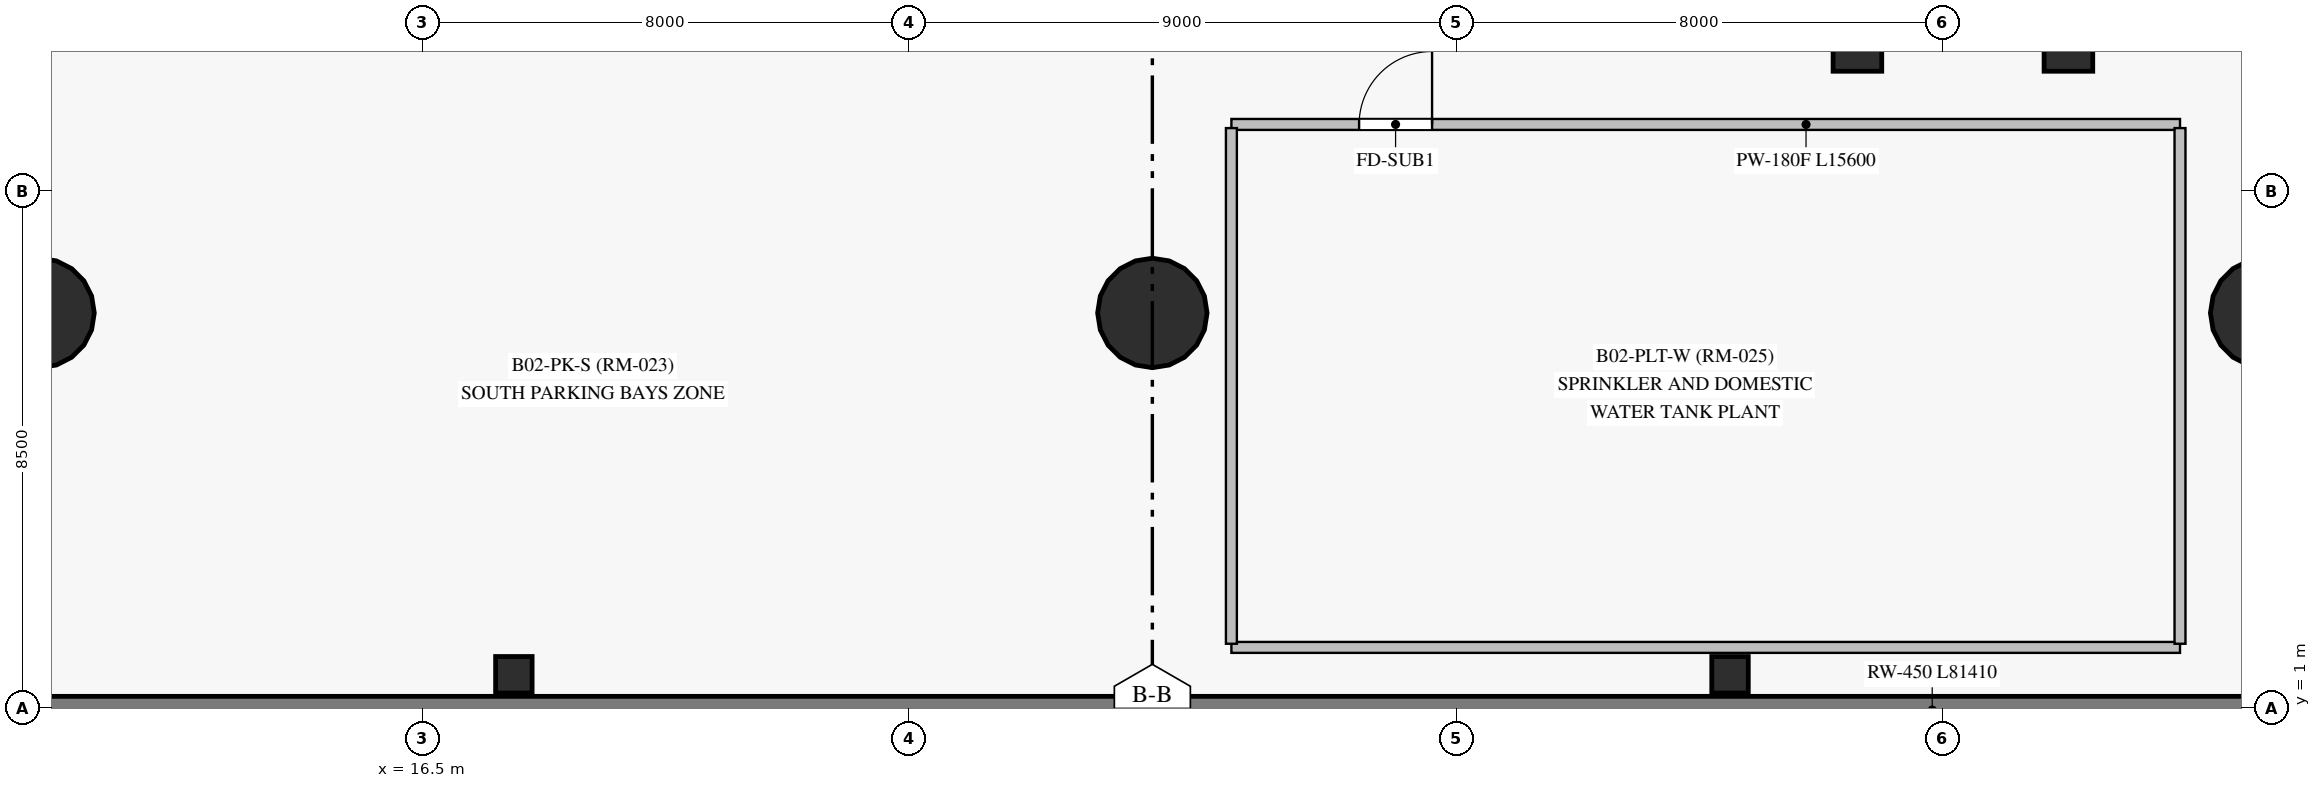
"""IFC4 building model, lengths in metres.
Left out: names, types, materials, properties, quantities, classifications, styles, units other than length and angle.
Written with IfcOpenShell. Run it as: python <this file> out.ifc"""

import sys

from ifc_helpers import new_model, si_unit, direction, frame, frame_2d, origin, origin_with_axes, origin_2d, place, context, subcontext, project, spatial, rectangle, circle, extrude, source, transform, mapped, element, fill, save


model = new_model("IFC4")
c1 = context("Model", 3, precision=1e-05, world=origin(), true_north=direction((0.0, 1.0)))
c2 = subcontext(c1, "Body", "Model", "MODEL_VIEW")
j1 = project(units=[si_unit("LENGTHUNIT", "METRE"), si_unit("PLANEANGLEUNIT", "RADIAN")], contexts=[c1])
p1 = place(None, origin())
s1 = spatial("IfcSite", under=j1, at=p1, CompositionType="ELEMENT")
p2 = place(p1, origin())
s2 = spatial("IfcBuilding", under=s1, at=p2, CompositionType="ELEMENT")
p3 = place(p2, frame((0.0, 0.0, -8.4)))
s3 = spatial("IfcBuildingStorey", under=s2, at=p3, CompositionType="ELEMENT", Elevation=-8.4)
m1 = source(origin_with_axes(), c2, "Body", "SweptSolid", [
    extrude(rectangle(XDim=0.8, YDim=0.8, at=origin_2d()), origin(), (0.0, 0.0, 1.0), 4.2),
])
for number, where, z_axis, x_axis in (
    (1, (40.095, 11.875, 0.0), (0.0, 0.0, 1.0), (1.0, 0.0, 0.0)),
    (2, (43.565, 11.875, 0.0), (0.0, 0.0, 1.0), (1.0, 0.0, 0.0)),
):
    element("IfcColumn", number, at=place(p3, frame(where, z_axis=z_axis, x_axis=x_axis)), inside=s3, PredefinedType="COLUMN", context=c2, shape_type="MappedRepresentation", body=[
        mapped(m1, transform((0.0, 0.0, 0.0), scale=1.0)),
    ])
m2 = source(origin_with_axes(), c2, "Body", "SweptSolid", [
    extrude(rectangle(XDim=0.6, YDim=0.6, at=origin_2d()), origin(), (0.0, 0.0, 1.0), 4.2),
])
for number, where, z_axis, x_axis in (
    (3, (18.0, 1.55, 0.0), (0.0, 0.0, 1.0), (1.0, 0.0, 0.0)),
    (4, (38.0, 1.55, 0.0), (0.0, 0.0, 1.0), (1.0, 0.0, 0.0)),
):
    element("IfcColumn", number, at=place(p3, frame(where, z_axis=z_axis, x_axis=x_axis)), inside=s3, PredefinedType="COLUMN", context=c2, shape_type="MappedRepresentation", body=[
        mapped(m2, transform((0.0, 0.0, 0.0), scale=1.0)),
    ])
p4 = place(p3, frame((0.62, 0.97, 0.0), z_axis=(0.0, 0.0, 1.0), x_axis=(1.0, 0.0, 0.0)))
e5 = element("IfcWall", 5, at=p4, inside=s3, PredefinedType="USERDEFINED", context=c2, shape_type="SweptSolid", body=[
    extrude(rectangle(XDim=81.41, YDim=0.45, at=frame_2d((40.705, 0.0))), origin(), (0.0, 0.0, 1.0), 3.85),
])
m3 = source(origin_with_axes(), c2, "Body", "SweptSolid", [
    extrude(circle(Radius=0.9, at=origin_2d()), origin(), (0.0, 0.0, 1.0), 4.2),
])
for number, where, z_axis, x_axis in (
    (6, (10.2, 7.5, 0.0), (0.0, 0.0, 1.0), (1.0, 0.0, 0.0)),
    (7, (28.5, 7.5, 0.0), (0.0, 0.0, 1.0), (1.0, 0.0, 0.0)),
    (8, (46.8, 7.5, 0.0), (0.0, 0.0, 1.0), (1.0, 0.0, 0.0)),
):
    element("IfcColumn", number, at=place(p3, frame(where, z_axis=z_axis, x_axis=x_axis)), inside=s3, PredefinedType="COLUMN", context=c2, shape_type="MappedRepresentation", body=[
        mapped(m3, transform((0.0, 0.0, 0.0), scale=1.0)),
    ])
p5 = place(p3, frame((29.8, 10.6, 0.0), z_axis=(0.0, 0.0, 1.0), x_axis=(1.0, 0.0, 0.0)))
e9 = element("IfcWall", 9, at=p5, inside=s3, PredefinedType="PARTITIONING", context=c2, shape_type="SweptSolid", body=[
    extrude(rectangle(XDim=15.6, YDim=0.18, at=frame_2d((7.8, 0.0))), origin(), (0.0, 0.0, 1.0), 3.85),
])
p6 = place(p5, frame((2.1, 0.0, 0.0)))
e10 = element("IfcOpeningElement", 10, at=p6, cuts=e9, PredefinedType="OPENING", context=c2, shape_type="SweptSolid", body=[
    extrude(rectangle(XDim=1.2, YDim=2.15, at=frame_2d((0.6, 1.075))), frame((0.0, 0.1, 0.0), z_axis=(0.0, -1.0, 0.0), x_axis=(1.0, 0.0, 0.0)), (0.0, 0.0, 1.0), 0.2),
])
p7 = place(p3, frame((29.8, 2.0, 0.0), z_axis=(0.0, 0.0, 1.0), x_axis=(1.0, 0.0, 0.0)))
e11 = element("IfcWall", 11, at=p7, inside=s3, PredefinedType="PARTITIONING", context=c2, shape_type="SweptSolid", body=[
    extrude(rectangle(XDim=15.6, YDim=0.18, at=frame_2d((7.8, 0.0))), origin(), (0.0, 0.0, 1.0), 3.85),
])
p8 = place(p3, frame((29.8, 2.06, 0.0), z_axis=(0.0, 0.0, 1.0), x_axis=(0.0, 1.0, 0.0)))
e12 = element("IfcWall", 12, at=p8, inside=s3, PredefinedType="PARTITIONING", context=c2, shape_type="SweptSolid", body=[
    extrude(rectangle(XDim=8.48, YDim=0.18, at=frame_2d((4.24, 0.0))), origin(), (0.0, 0.0, 1.0), 3.85),
])
p9 = place(p3, frame((45.4, 2.06, 0.0), z_axis=(0.0, 0.0, 1.0), x_axis=(0.0, 1.0, 0.0)))
e13 = element("IfcWall", 13, at=p9, inside=s3, PredefinedType="PARTITIONING", context=c2, shape_type="SweptSolid", body=[
    extrude(rectangle(XDim=8.48, YDim=0.18, at=frame_2d((4.24, 0.0))), origin(), (0.0, 0.0, 1.0), 2.9),
])
m4 = source(origin_with_axes(), c2, "Body", "SweptSolid", [
    extrude(rectangle(XDim=1.2, YDim=2.15, at=frame_2d((0.6, 1.075))), frame((0.0, 0.025, 0.0), z_axis=(0.0, -1.0, 0.0), x_axis=(1.0, 0.0, 0.0)), (0.0, 0.0, 1.0), 0.05),
])
p10 = place(p6, origin())
e14 = element("IfcDoor", 14, at=p10, inside=s3, OperationType="SINGLE_SWING_RIGHT", PredefinedType="DOOR", context=c2, shape_type="MappedRepresentation", body=[
    mapped(m4, transform((0.0, 0.0, 0.0), scale=1.0)),
])
fill(e10, e14)
save(model, sys.argv[1])
